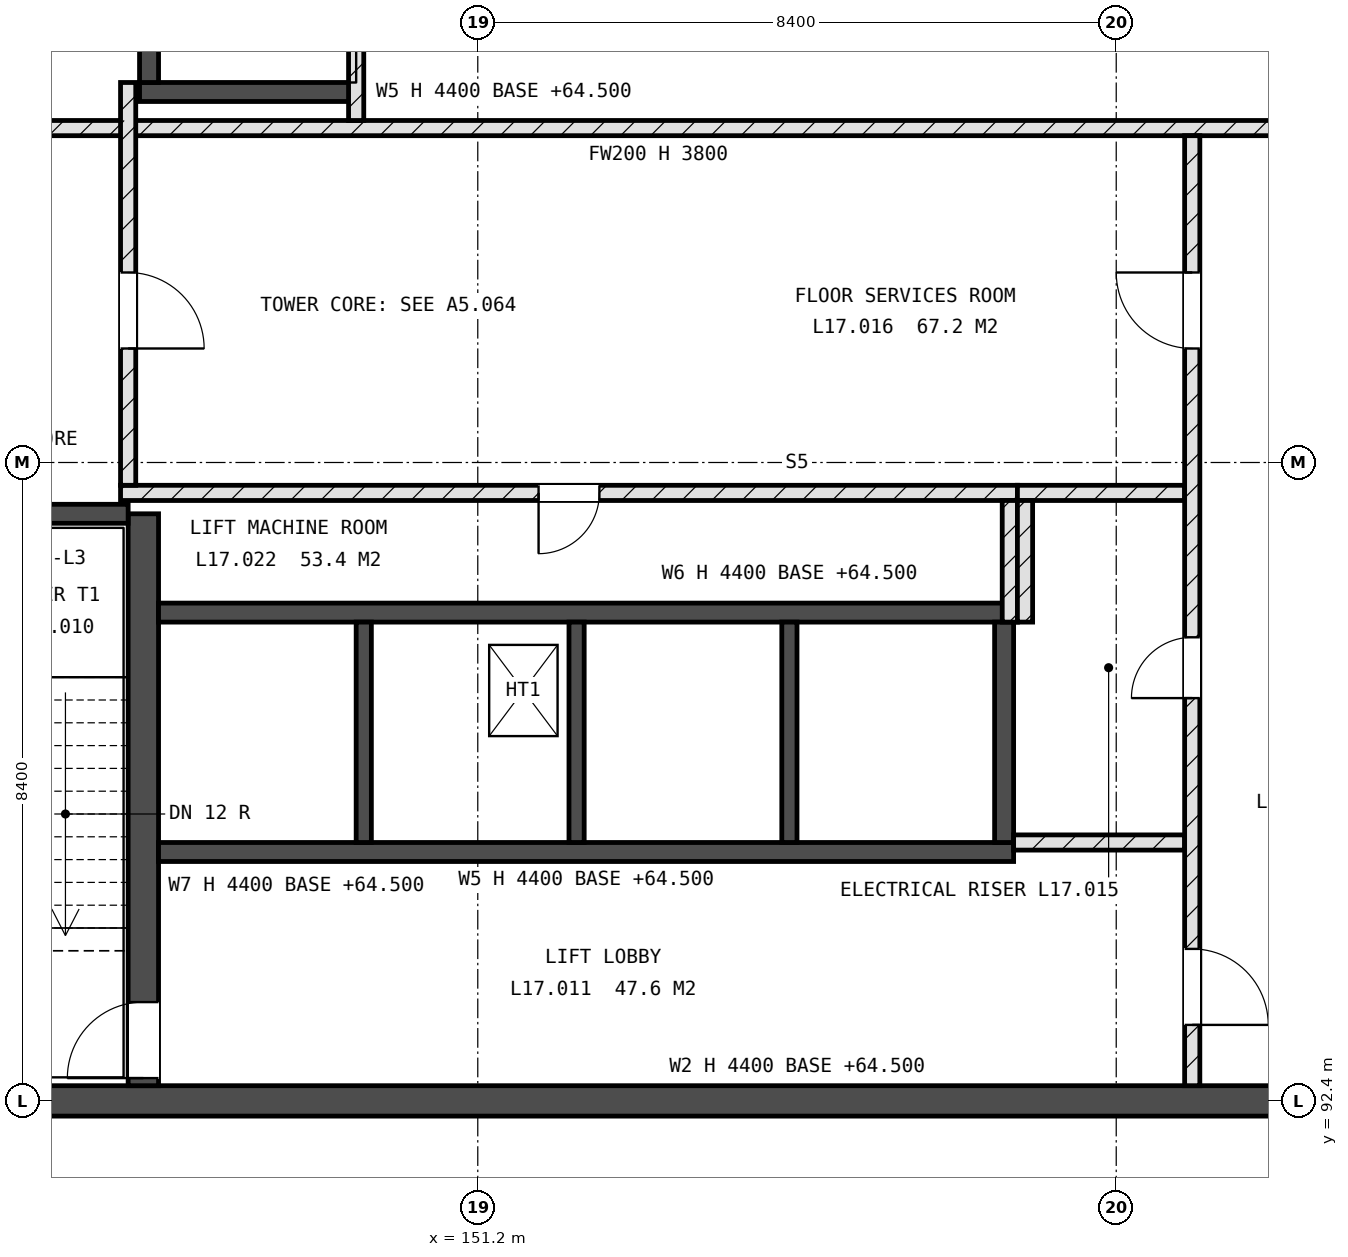
"""IFC4 building model, lengths in metres.
Left out: names, types, materials, properties, quantities, classifications, styles, units other than length and angle.
Written with IfcOpenShell. Run it as: python <this file> out.ifc"""

import sys

from ifc_helpers import new_model, si_unit, direction, frame, frame_2d, origin, origin_2d, place, context, subcontext, project, spatial, rectangle, extrude, element, fill, save


model = new_model("IFC4")
c1 = context("Model", 3, precision=1e-05, world=origin(), true_north=direction((0.0, 1.0)))
c2 = subcontext(c1, "Body", "Model", "MODEL_VIEW")
j1 = project(units=[si_unit("LENGTHUNIT", "METRE"), si_unit("PLANEANGLEUNIT", "RADIAN")], contexts=[c1])
p1 = place(None, origin())
s1 = spatial("IfcSite", under=j1, at=p1, CompositionType="ELEMENT")
p2 = place(p1, origin())
s2 = spatial("IfcBuilding", under=s1, at=p2, CompositionType="ELEMENT")
p3 = place(p2, frame((0.0, 0.0, 64.8)))
s3 = spatial("IfcBuildingStorey", under=s2, at=p3, CompositionType="ELEMENT", Elevation=64.8)
p4 = place(p3, frame((142.8, 92.4, -0.3), z_axis=(0.0, 0.0, 1.0), x_axis=(1.0, 0.0, 0.0)))
e1 = element("IfcWall", 1, at=p4, inside=s3, PredefinedType="SHEAR", context=c2, shape_type="SweptSolid", body=[
    extrude(rectangle(XDim=25.2, YDim=0.4, at=frame_2d((12.6, 0.0))), origin(), (0.0, 0.0, 1.0), 4.4),
])
p5 = place(p4, frame((19.0, 0.0, 0.3)))
e2 = element("IfcOpeningElement", 2, at=p5, cuts=e1, PredefinedType="OPENING", context=c2, shape_type="SweptSolid", body=[
    extrude(rectangle(XDim=1.2, YDim=2.4, at=frame_2d((0.6, 1.2))), frame((0.0, 0.21, 0.0), z_axis=(0.0, -1.0, 0.0), x_axis=(1.0, 0.0, 0.0)), (0.0, 0.0, 1.0), 0.42),
])
p6 = place(p3, frame((146.8, 92.6, -0.3), z_axis=(0.0, 0.0, 1.0), x_axis=(0.0, 1.0, 0.0)))
e3 = element("IfcWall", 3, at=p6, inside=s3, PredefinedType="SHEAR", context=c2, shape_type="SweptSolid", body=[
    extrude(rectangle(XDim=7.525, YDim=0.4, at=frame_2d((3.762, 0.0))), origin(), (0.0, 0.0, 1.0), 4.4),
])
p7 = place(p6, frame((0.1, 0.0, 0.3)))
e4 = element("IfcOpeningElement", 4, at=p7, cuts=e3, PredefinedType="OPENING", context=c2, shape_type="SweptSolid", body=[
    extrude(rectangle(XDim=1.0, YDim=2.1, at=frame_2d((0.5, 1.05))), frame((0.0, 0.21, 0.0), z_axis=(0.0, -1.0, 0.0), x_axis=(1.0, 0.0, 0.0)), (0.0, 0.0, 1.0), 0.42),
])
p8 = place(p3, frame((143.2, 100.125, -0.3), z_axis=(0.0, 0.0, 1.0), x_axis=(1.0, 0.0, 0.0)))
e5 = element("IfcWall", 5, at=p8, inside=s3, PredefinedType="SHEAR", context=c2, shape_type="SweptSolid", body=[
    extrude(rectangle(XDim=3.4, YDim=0.25, at=frame_2d((1.7, 0.0))), origin(), (0.0, 0.0, 1.0), 4.4),
])
for number, where, z_axis, x_axis in (
    (6, (147.0, 95.675, -0.3), (0.0, 0.0, 1.0), (1.0, 0.0, 0.0)),
    (7, (147.0, 98.825, -0.3), (0.0, 0.0, 1.0), (1.0, 0.0, 0.0)),
):
    element("IfcWall", number, at=place(p3, frame(where, z_axis=z_axis, x_axis=x_axis)), inside=s3, PredefinedType="SHEAR", context=c2, shape_type="SweptSolid", body=[
        extrude(rectangle(XDim=11.25, YDim=0.25, at=frame_2d((5.625, 0.0))), origin(), (0.0, 0.0, 1.0), 4.4),
    ])
p9 = place(p3, frame((158.125, 95.8, -0.3), z_axis=(0.0, 0.0, 1.0), x_axis=(0.0, 1.0, 0.0)))
e8 = element("IfcWall", 8, at=p9, inside=s3, PredefinedType="SHEAR", context=c2, shape_type="SweptSolid", body=[
    extrude(rectangle(XDim=2.9, YDim=0.25, at=frame_2d((1.45, 0.0))), origin(), (0.0, 0.0, 1.0), 4.4),
])
for number, where, z_axis, x_axis in (
    (9, (149.7, 95.8, -0.3), (0.0, 0.0, 1.0), (0.0, 1.0, 0.0)),
    (10, (152.5, 95.8, -0.3), (0.0, 0.0, 1.0), (0.0, 1.0, 0.0)),
    (11, (155.3, 95.8, -0.3), (0.0, 0.0, 1.0), (0.0, 1.0, 0.0)),
):
    element("IfcWall", number, at=place(p3, frame(where, z_axis=z_axis, x_axis=x_axis)), inside=s3, PredefinedType="SHEAR", context=c2, shape_type="SweptSolid", body=[
        extrude(rectangle(XDim=2.9, YDim=0.2, at=frame_2d((1.45, 0.0))), origin(), (0.0, 0.0, 1.0), 4.4),
    ])
p10 = place(p3, frame((146.75, 105.675, -0.3), z_axis=(0.0, 0.0, 1.0), x_axis=(1.0, 0.0, 0.0)))
e12 = element("IfcWall", 12, at=p10, inside=s3, PredefinedType="SHEAR", context=c2, shape_type="SweptSolid", body=[
    extrude(rectangle(XDim=2.85, YDim=0.25, at=frame_2d((1.425, 0.0))), origin(), (0.0, 0.0, 1.0), 4.4),
])
p11 = place(p3, frame((146.875, 105.8, -0.3), z_axis=(0.0, 0.0, 1.0), x_axis=(0.0, 1.0, 0.0)))
e13 = element("IfcWall", 13, at=p11, inside=s3, PredefinedType="SHEAR", context=c2, shape_type="SweptSolid", body=[
    extrude(rectangle(XDim=2.9, YDim=0.25, at=frame_2d((1.45, 0.0))), origin(), (0.0, 0.0, 1.0), 4.4),
])
p12 = place(p3, frame((158.25, 95.8, 0.0), z_axis=(0.0, 0.0, 1.0), x_axis=(1.0, 0.0, 0.0)))
e14 = element("IfcWall", 14, at=p12, inside=s3, PredefinedType="SOLIDWALL", context=c2, shape_type="SweptSolid", body=[
    extrude(rectangle(XDim=2.25, YDim=0.2, at=frame_2d((1.125, 0.0))), origin(), (0.0, 0.0, 1.0), 3.8),
])
p13 = place(p3, frame((146.5, 100.4, 0.0), z_axis=(0.0, 0.0, 1.0), x_axis=(1.0, 0.0, 0.0)))
e15 = element("IfcWall", 15, at=p13, inside=s3, PredefinedType="SOLIDWALL", context=c2, shape_type="SweptSolid", body=[
    extrude(rectangle(XDim=11.8, YDim=0.2, at=frame_2d((5.9, 0.0))), origin(), (0.0, 0.0, 1.0), 3.8),
])
p14 = place(p13, frame((5.5, 0.0, 0.0)))
e16 = element("IfcOpeningElement", 16, at=p14, cuts=e15, PredefinedType="OPENING", context=c2, shape_type="SweptSolid", body=[
    extrude(rectangle(XDim=0.8, YDim=2.1, at=frame_2d((0.4, 1.05))), frame((0.0, 0.11, 0.0), z_axis=(0.0, -1.0, 0.0), x_axis=(1.0, 0.0, 0.0)), (0.0, 0.0, 1.0), 0.22),
])
p15 = place(p3, frame((158.3, 100.4, 0.0), z_axis=(0.0, 0.0, 1.0), x_axis=(1.0, 0.0, 0.0)))
e17 = element("IfcWall", 17, at=p15, inside=s3, PredefinedType="SOLIDWALL", context=c2, shape_type="SweptSolid", body=[
    extrude(rectangle(XDim=2.2, YDim=0.2, at=frame_2d((1.1, 0.0))), origin(), (0.0, 0.0, 1.0), 3.8),
])
p16 = place(p3, frame((143.2, 105.2, 0.0), z_axis=(0.0, 0.0, 1.0), x_axis=(1.0, 0.0, 0.0)))
e18 = element("IfcWall", 18, at=p16, inside=s3, PredefinedType="SOLIDWALL", context=c2, shape_type="SweptSolid", body=[
    extrude(rectangle(XDim=20.75, YDim=0.2, at=frame_2d((10.375, 0.0))), origin(), (0.0, 0.0, 1.0), 3.8),
])
p17 = place(p16, frame((18.7, 0.0, 0.0)))
e19 = element("IfcOpeningElement", 19, at=p17, cuts=e18, PredefinedType="OPENING", context=c2, shape_type="SweptSolid", body=[
    extrude(rectangle(XDim=1.0, YDim=2.1, at=frame_2d((0.5, 1.05))), frame((0.0, 0.11, 0.0), z_axis=(0.0, -1.0, 0.0), x_axis=(1.0, 0.0, 0.0)), (0.0, 0.0, 1.0), 0.22),
])
p18 = place(p3, frame((146.6, 100.5, 0.0), z_axis=(0.0, 0.0, 1.0), x_axis=(0.0, 1.0, 0.0)))
e20 = element("IfcWall", 20, at=p18, inside=s3, PredefinedType="SOLIDWALL", context=c2, shape_type="SweptSolid", body=[
    extrude(rectangle(XDim=5.3, YDim=0.2, at=frame_2d((2.65, 0.0))), origin(), (0.0, 0.0, 1.0), 3.8),
])
p19 = place(p18, frame((1.8, 0.0, 0.0)))
e21 = element("IfcOpeningElement", 21, at=p19, cuts=e20, PredefinedType="OPENING", context=c2, shape_type="SweptSolid", body=[
    extrude(rectangle(XDim=1.0, YDim=2.1, at=frame_2d((0.5, 1.05))), frame((0.0, 0.11, 0.0), z_axis=(0.0, -1.0, 0.0), x_axis=(1.0, 0.0, 0.0)), (0.0, 0.0, 1.0), 0.22),
])
p20 = place(p3, frame((149.6, 105.3, 0.0), z_axis=(0.0, 0.0, 1.0), x_axis=(0.0, 1.0, 0.0)))
e22 = element("IfcWall", 22, at=p20, inside=s3, PredefinedType="SOLIDWALL", context=c2, shape_type="SweptSolid", body=[
    extrude(rectangle(XDim=3.7, YDim=0.2, at=frame_2d((1.85, 0.0))), origin(), (0.0, 0.0, 1.0), 3.8),
])
p21 = place(p20, frame((1.4, 0.0, 0.0)))
e23 = element("IfcOpeningElement", 23, at=p21, cuts=e22, PredefinedType="OPENING", context=c2, shape_type="SweptSolid", body=[
    extrude(rectangle(XDim=1.1, YDim=2.1, at=frame_2d((0.55, 1.05))), frame((0.0, 0.11, 0.0), z_axis=(0.0, -1.0, 0.0), x_axis=(1.0, 0.0, 0.0)), (0.0, 0.0, 1.0), 0.22),
])
for number, where, z_axis, x_axis in (
    (24, (158.2, 98.7, 0.0), (0.0, 0.0, 1.0), (0.0, 1.0, 0.0)),
    (25, (158.4, 98.7, 0.0), (0.0, 0.0, 1.0), (0.0, 1.0, 0.0)),
):
    element("IfcWall", number, at=place(p3, frame(where, z_axis=z_axis, x_axis=x_axis)), inside=s3, PredefinedType="SOLIDWALL", context=c2, shape_type="SweptSolid", body=[
        extrude(rectangle(XDim=1.6, YDim=0.2, at=frame_2d((0.8, 0.0))), origin(), (0.0, 0.0, 1.0), 3.8),
    ])
p22 = place(p3, frame((160.6, 92.6, 0.0), z_axis=(0.0, 0.0, 1.0), x_axis=(0.0, 1.0, 0.0)))
e26 = element("IfcWall", 26, at=p22, inside=s3, PredefinedType="SOLIDWALL", context=c2, shape_type="SweptSolid", body=[
    extrude(rectangle(XDim=12.5, YDim=0.2, at=frame_2d((6.25, 0.0))), origin(), (0.0, 0.0, 1.0), 3.8),
])
p23 = place(p22, frame((5.1, 0.0, 0.0)))
e27 = element("IfcOpeningElement", 27, at=p23, cuts=e26, PredefinedType="OPENING", context=c2, shape_type="SweptSolid", body=[
    extrude(rectangle(XDim=0.8, YDim=2.1, at=frame_2d((0.4, 1.05))), frame((0.0, 0.11, 0.0), z_axis=(0.0, -1.0, 0.0), x_axis=(1.0, 0.0, 0.0)), (0.0, 0.0, 1.0), 0.22),
])
p24 = place(p22, frame((9.7, 0.0, 0.0)))
e28 = element("IfcOpeningElement", 28, at=p24, cuts=e26, PredefinedType="OPENING", context=c2, shape_type="SweptSolid", body=[
    extrude(rectangle(XDim=1.0, YDim=2.1, at=frame_2d((0.5, 1.05))), frame((0.0, 0.11, 0.0), z_axis=(0.0, -1.0, 0.0), x_axis=(1.0, 0.0, 0.0)), (0.0, 0.0, 1.0), 0.22),
])
p25 = place(p22, frame((0.8, 0.0, 0.0)))
e29 = element("IfcOpeningElement", 29, at=p25, cuts=e26, PredefinedType="OPENING", context=c2, shape_type="SweptSolid", body=[
    extrude(rectangle(XDim=1.0, YDim=2.1, at=frame_2d((0.5, 1.05))), frame((0.0, 0.11, 0.0), z_axis=(0.0, -1.0, 0.0), x_axis=(1.0, 0.0, 0.0)), (0.0, 0.0, 1.0), 0.22),
])
p26 = place(p2, frame((0.0, 0.0, 68.9)))
p27 = place(p26, frame((0.0, 0.0, -0.3)))
p28 = place(p27, frame((151.8, 97.8, 0.0)))
p29 = place(p28, frame((0.0, 0.0, 0.25)))
e30 = element("IfcWindow", 30, at=p29, inside=s3, PartitioningType="SINGLE_PANEL", PredefinedType="SKYLIGHT", context=c2, shape_type="SweptSolid", body=[
    extrude(rectangle(XDim=0.9, YDim=1.2, at=origin_2d()), origin(), (0.0, 0.0, 1.0), 0.05),
])
p30 = place(p7, origin())
e31 = element("IfcDoor", 31, at=p30, inside=s3, OperationType="SINGLE_SWING_RIGHT", PredefinedType="DOOR", context=c2, shape_type="SweptSolid", body=[
    extrude(rectangle(XDim=1.0, YDim=2.1, at=frame_2d((0.5, 1.05))), frame((0.0, 0.025, 0.0), z_axis=(0.0, -1.0, 0.0), x_axis=(1.0, 0.0, 0.0)), (0.0, 0.0, 1.0), 0.05),
])
fill(e4, e31)
p31 = place(p23, origin())
e32 = element("IfcDoor", 32, at=p31, inside=s3, OperationType="SINGLE_SWING_RIGHT", PredefinedType="DOOR", context=c2, shape_type="SweptSolid", body=[
    extrude(rectangle(XDim=0.8, YDim=2.1, at=frame_2d((0.4, 1.05))), frame((0.0, 0.025, 0.0), z_axis=(0.0, -1.0, 0.0), x_axis=(1.0, 0.0, 0.0)), (0.0, 0.0, 1.0), 0.05),
])
fill(e27, e32)
p32 = place(p14, origin())
e33 = element("IfcDoor", 33, at=p32, inside=s3, OperationType="SINGLE_SWING_LEFT", PredefinedType="DOOR", context=c2, shape_type="SweptSolid", body=[
    extrude(rectangle(XDim=0.8, YDim=2.1, at=frame_2d((0.4, 1.05))), frame((0.0, 0.025, 0.0), z_axis=(0.0, -1.0, 0.0), x_axis=(1.0, 0.0, 0.0)), (0.0, 0.0, 1.0), 0.05),
])
fill(e16, e33)
p33 = place(p19, origin())
e34 = element("IfcDoor", 34, at=p33, inside=s3, OperationType="SINGLE_SWING_LEFT", PredefinedType="DOOR", context=c2, shape_type="SweptSolid", body=[
    extrude(rectangle(XDim=1.0, YDim=2.1, at=frame_2d((0.5, 1.05))), frame((0.0, 0.025, 0.0), z_axis=(0.0, -1.0, 0.0), x_axis=(1.0, 0.0, 0.0)), (0.0, 0.0, 1.0), 0.05),
])
fill(e21, e34)
p34 = place(p24, origin())
e35 = element("IfcDoor", 35, at=p34, inside=s3, OperationType="SINGLE_SWING_LEFT", PredefinedType="DOOR", context=c2, shape_type="SweptSolid", body=[
    extrude(rectangle(XDim=1.0, YDim=2.1, at=frame_2d((0.5, 1.05))), frame((0.0, 0.025, 0.0), z_axis=(0.0, -1.0, 0.0), x_axis=(1.0, 0.0, 0.0)), (0.0, 0.0, 1.0), 0.05),
])
fill(e28, e35)
p35 = place(p25, origin())
e36 = element("IfcDoor", 36, at=p35, inside=s3, OperationType="SINGLE_SWING_LEFT", PredefinedType="DOOR", context=c2, shape_type="SweptSolid", body=[
    extrude(rectangle(XDim=1.0, YDim=2.1, at=frame_2d((0.5, 1.05))), frame((0.0, 0.025, 0.0), z_axis=(0.0, -1.0, 0.0), x_axis=(1.0, 0.0, 0.0)), (0.0, 0.0, 1.0), 0.05),
])
fill(e29, e36)
save(model, sys.argv[1])
